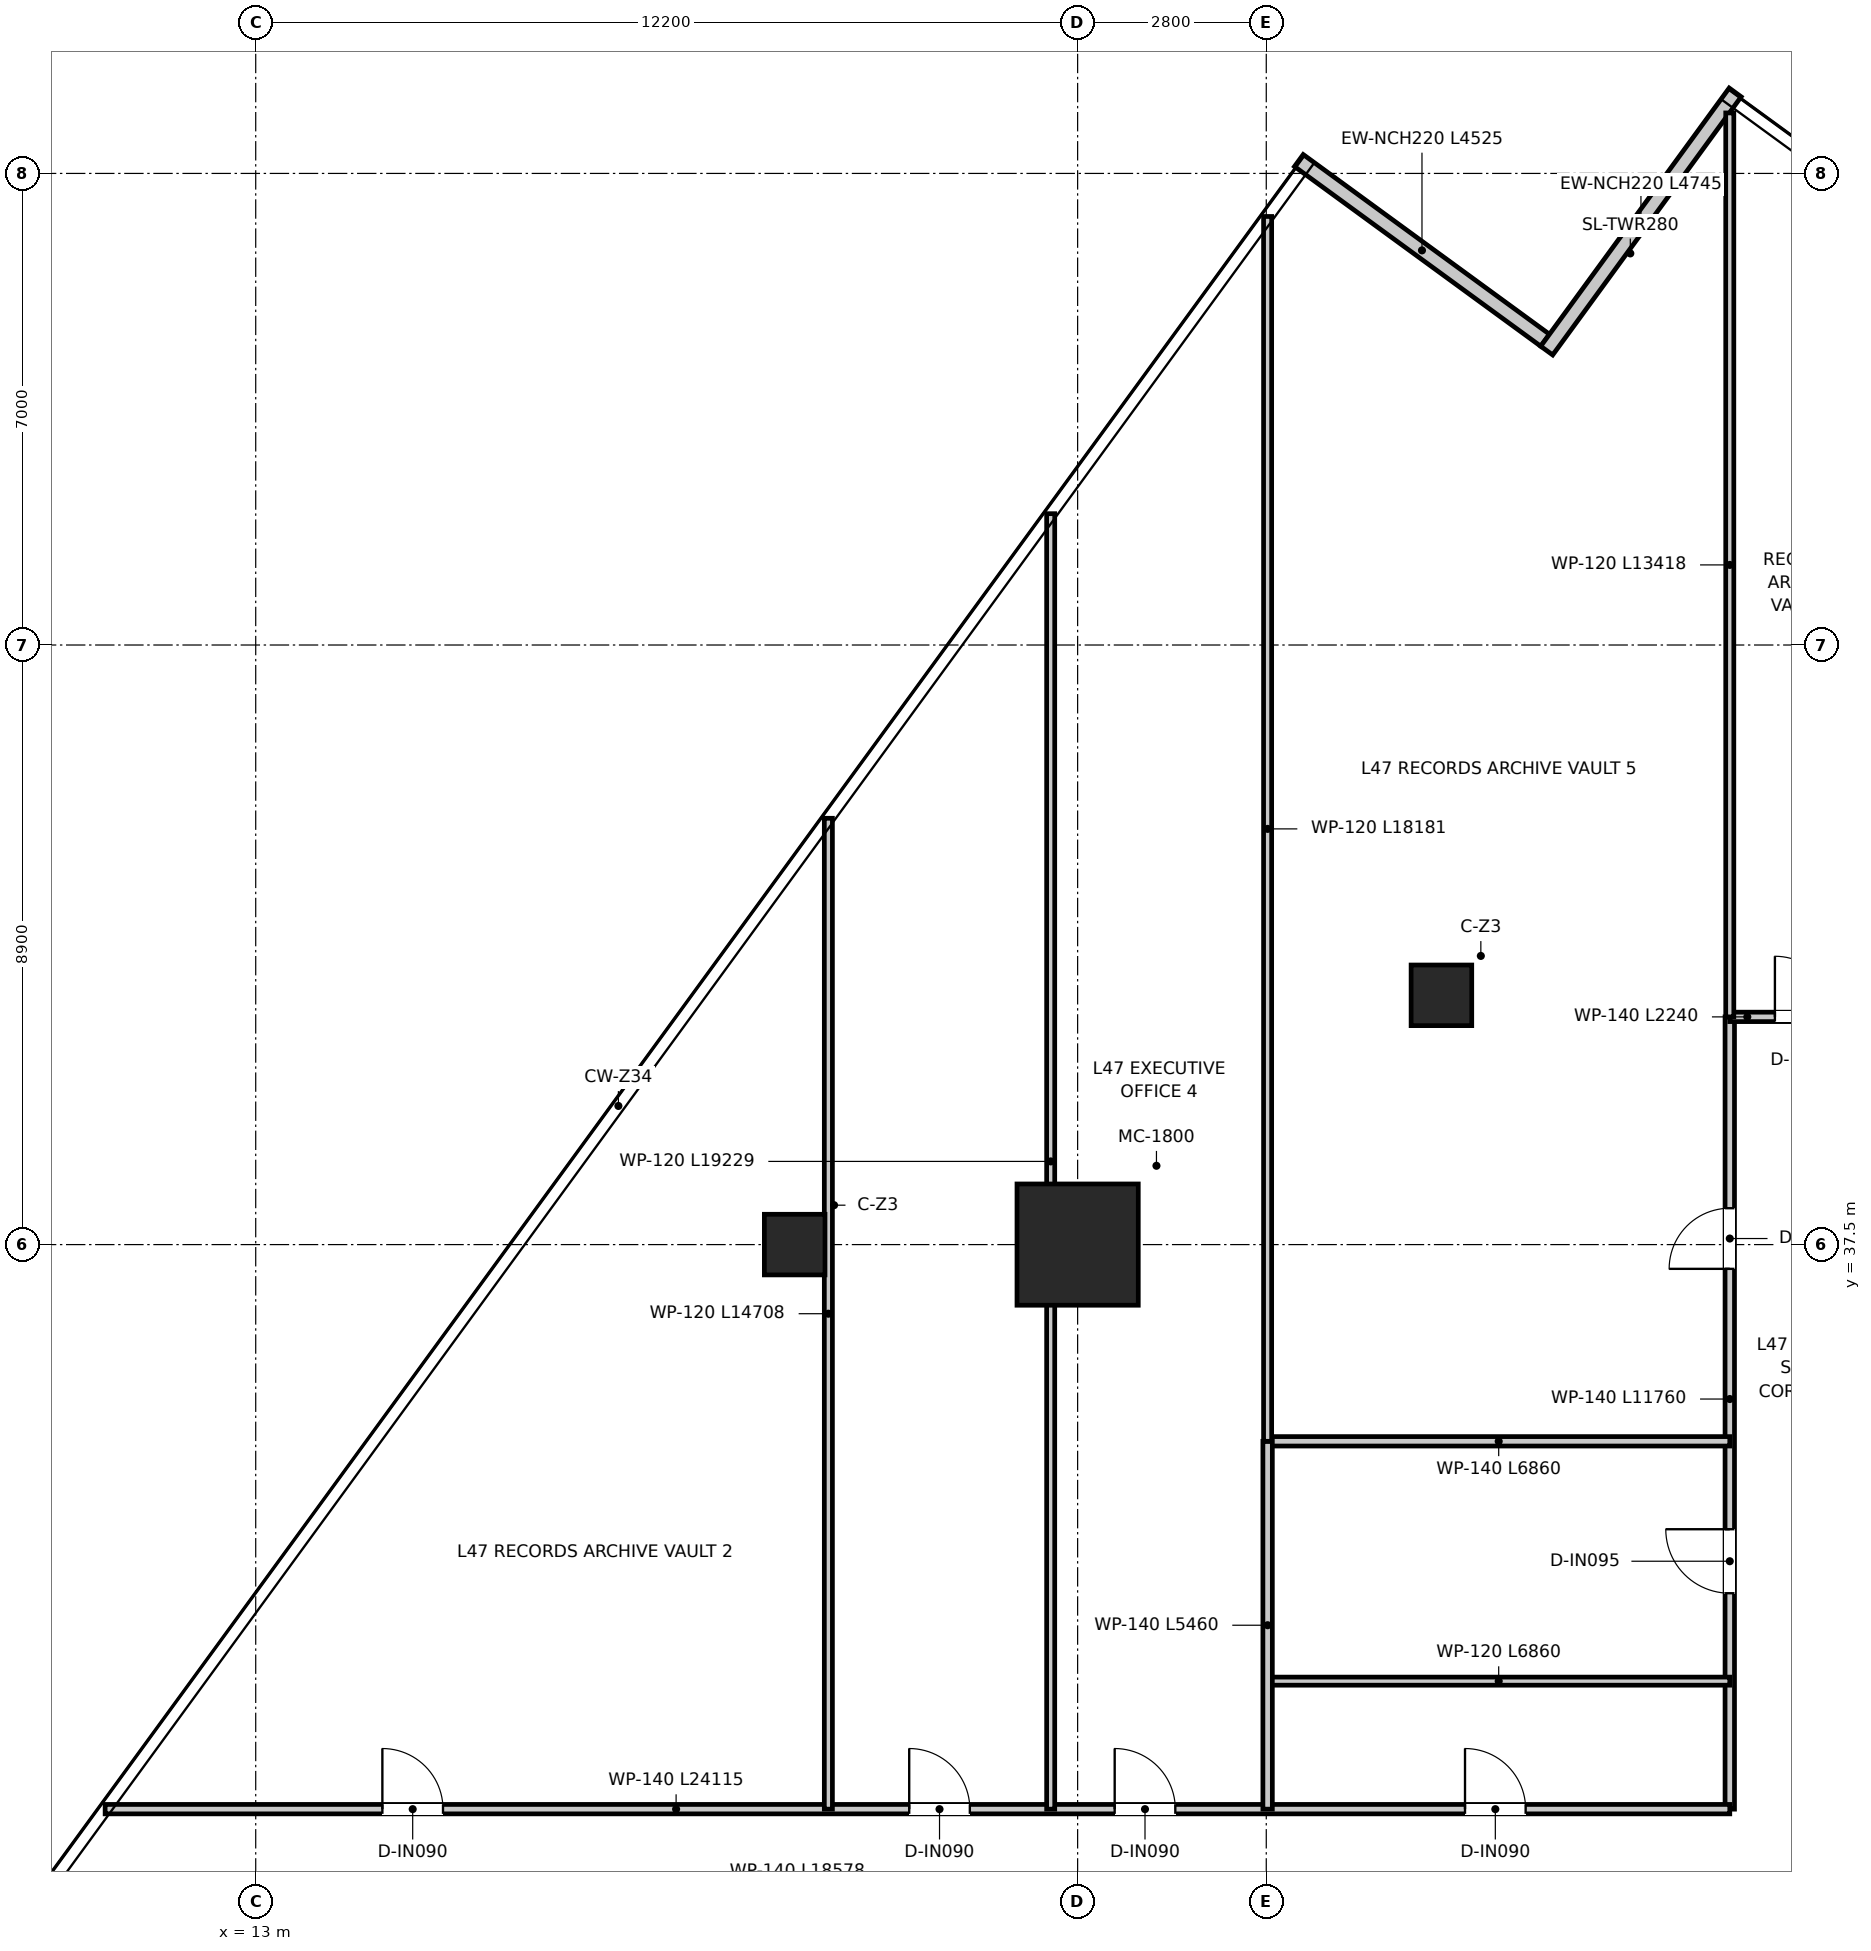
"""IFC4 building model, lengths in metres.
Left out: names, types, materials, properties, quantities, classifications, styles, units other than length and angle.
Written with IfcOpenShell. Run it as: python <this file> out.ifc"""

import sys

from ifc_helpers import new_model, si_unit, direction, frame, frame_2d, origin, origin_2d, place, context, subcontext, project, spatial, rectangle, extrude, source, transform, mapped, element, fill, save


model = new_model("IFC4")
c1 = context("Model", 3, precision=1e-05, world=origin(), true_north=direction((0.0, 1.0)))
c2 = subcontext(c1, "Body", "Model", "MODEL_VIEW")
j1 = project(units=[si_unit("LENGTHUNIT", "METRE"), si_unit("PLANEANGLEUNIT", "RADIAN")], contexts=[c1])
p1 = place(None, origin())
s1 = spatial("IfcSite", under=j1, at=p1, CompositionType="ELEMENT")
p2 = place(p1, origin())
s2 = spatial("IfcBuilding", under=s1, at=p2, CompositionType="ELEMENT")
p3 = place(p2, frame((0.0, 0.0, 193.6)))
s3 = spatial("IfcBuildingStorey", under=s2, at=p3, CompositionType="ELEMENT", Elevation=193.6)
m1 = source(origin(), c2, "Body", "SweptSolid", [
    extrude(rectangle(XDim=1.8, YDim=1.8, at=origin_2d()), origin(), (0.0, 0.0, 1.0), 3.95),
])
p4 = place(p3, frame((25.2, 37.5, 0.0), z_axis=(0.0, 0.0, 1.0), x_axis=(1.0, 0.0, 0.0)))
e1 = element("IfcColumn", 1, at=p4, inside=s3, PredefinedType="USERDEFINED", context=c2, shape_type="MappedRepresentation", body=[
    mapped(m1, transform((0.0, 0.0, 0.0), x_axis=(1.0, 0.0, 0.0), y_axis=(0.0, 1.0, 0.0), z_axis=(0.0, 0.0, 1.0), scale=1.0)),
])
m2 = source(origin(), c2, "Body", "SweptSolid", [
    extrude(rectangle(XDim=0.9, YDim=0.9, at=origin_2d()), origin(), (0.0, 0.0, 1.0), 3.95),
])
for number, where, z_axis, x_axis in (
    (2, (21.0, 37.5, 0.0), (0.0, 0.0, 1.0), (1.0, 0.0, 0.0)),
    (3, (30.6, 41.2, 0.0), (0.0, 0.0, 1.0), (1.0, 0.0, 0.0)),
):
    element("IfcColumn", number, at=place(p3, frame(where, z_axis=z_axis, x_axis=x_axis)), inside=s3, PredefinedType="COLUMN", context=c2, shape_type="MappedRepresentation", body=[
        mapped(m2, transform((0.0, 0.0, 0.0), x_axis=(1.0, 0.0, 0.0), y_axis=(0.0, 1.0, 0.0), z_axis=(0.0, 0.0, 1.0), scale=1.0)),
    ])
p5 = place(p3, frame((32.139, 50.924, 0.0), z_axis=(0.0, 0.0, 1.0), x_axis=(-0.807734007732, 0.589547091209, 0.0)))
e4 = element("IfcWall", 4, at=p5, inside=s3, PredefinedType="ELEMENTEDWALL", context=c2, shape_type="SweptSolid", body=[
    extrude(rectangle(XDim=4.525, YDim=0.22, at=frame_2d((2.263, 0.0))), origin(), (0.0, 0.0, 1.0), 3.67),
])
p6 = place(p3, frame((34.96, 54.603, 0.0), z_axis=(0.0, 0.0, 1.0), x_axis=(-0.589559809791, -0.807724724568, 0.0)))
e5 = element("IfcWall", 5, at=p6, inside=s3, PredefinedType="ELEMENTEDWALL", context=c2, shape_type="SweptSolid", body=[
    extrude(rectangle(XDim=4.745, YDim=0.22, at=frame_2d((2.373, 0.0))), origin(), (0.0, 0.0, 1.0), 3.67),
])
p7 = place(p3, frame((34.88, 29.12, 0.0), z_axis=(0.0, 0.0, 1.0), x_axis=(0.0, 1.0, 0.0)))
e6 = element("IfcWall", 6, at=p7, inside=s3, PredefinedType="PARTITIONING", context=c2, shape_type="SweptSolid", body=[
    extrude(rectangle(XDim=11.76, YDim=0.14, at=frame_2d((5.88, 0.0))), origin(), (0.0, 0.0, 1.0), 3.03),
])
p8 = place(p7, frame((3.205, 0.0, 0.0)))
e7 = element("IfcOpeningElement", 7, at=p8, cuts=e6, PredefinedType="OPENING", context=c2, shape_type="SweptSolid", body=[
    extrude(rectangle(XDim=0.95, YDim=2.1, at=frame_2d((0.475, 1.05))), frame((0.0, 0.08, 0.0), z_axis=(0.0, -1.0, 0.0), x_axis=(1.0, 0.0, 0.0)), (0.0, 0.0, 1.0), 0.16),
])
p9 = place(p7, frame((8.02, 0.0, 0.0)))
e8 = element("IfcOpeningElement", 8, at=p9, cuts=e6, PredefinedType="OPENING", context=c2, shape_type="SweptSolid", body=[
    extrude(rectangle(XDim=0.9, YDim=2.1, at=frame_2d((0.45, 1.05))), frame((0.0, 0.08, 0.0), z_axis=(0.0, -1.0, 0.0), x_axis=(1.0, 0.0, 0.0)), (0.0, 0.0, 1.0), 0.16),
])
p10 = place(p3, frame((34.88, 40.88, 0.0), z_axis=(0.0, 0.0, 1.0), x_axis=(1.0, 0.0, 0.0)))
e9 = element("IfcWall", 9, at=p10, inside=s3, PredefinedType="PARTITIONING", context=c2, shape_type="SweptSolid", body=[
    extrude(rectangle(XDim=2.24, YDim=0.14, at=frame_2d((1.12, 0.0))), origin(), (0.0, 0.0, 1.0), 3.67),
])
p11 = place(p10, frame((0.67, 0.0, 0.0)))
e10 = element("IfcOpeningElement", 10, at=p11, cuts=e9, PredefinedType="OPENING", context=c2, shape_type="SweptSolid", body=[
    extrude(rectangle(XDim=0.9, YDim=2.1, at=frame_2d((0.45, 1.05))), frame((0.0, 0.08, 0.0), z_axis=(0.0, -1.0, 0.0), x_axis=(1.0, 0.0, 0.0)), (0.0, 0.0, 1.0), 0.16),
])
p12 = place(p3, frame((10.765, 29.12, 0.0), z_axis=(0.0, 0.0, 1.0), x_axis=(1.0, 0.0, 0.0)))
e11 = element("IfcWall", 11, at=p12, inside=s3, PredefinedType="PARTITIONING", context=c2, shape_type="SweptSolid", body=[
    extrude(rectangle(XDim=24.115, YDim=0.14, at=frame_2d((12.058, 0.0))), origin(), (0.0, 0.0, 1.0), 3.03),
])
p13 = place(p12, frame((20.185, 0.0, 0.0)))
e12 = element("IfcOpeningElement", 12, at=p13, cuts=e11, PredefinedType="OPENING", context=c2, shape_type="SweptSolid", body=[
    extrude(rectangle(XDim=0.9, YDim=2.1, at=frame_2d((0.45, 1.05))), frame((0.0, 0.08, 0.0), z_axis=(0.0, -1.0, 0.0), x_axis=(1.0, 0.0, 0.0)), (0.0, 0.0, 1.0), 0.16),
])
p14 = place(p12, frame((4.115, 0.0, 0.0)))
e13 = element("IfcOpeningElement", 13, at=p14, cuts=e11, PredefinedType="OPENING", context=c2, shape_type="SweptSolid", body=[
    extrude(rectangle(XDim=0.9, YDim=2.1, at=frame_2d((0.45, 1.05))), frame((0.0, 0.08, 0.0), z_axis=(0.0, -1.0, 0.0), x_axis=(1.0, 0.0, 0.0)), (0.0, 0.0, 1.0), 0.16),
])
p15 = place(p12, frame((11.935, 0.0, 0.0)))
e14 = element("IfcOpeningElement", 14, at=p15, cuts=e11, PredefinedType="OPENING", context=c2, shape_type="SweptSolid", body=[
    extrude(rectangle(XDim=0.9, YDim=2.1, at=frame_2d((0.45, 1.05))), frame((0.0, 0.08, 0.0), z_axis=(0.0, -1.0, 0.0), x_axis=(1.0, 0.0, 0.0)), (0.0, 0.0, 1.0), 0.16),
])
p16 = place(p12, frame((14.985, 0.0, 0.0)))
e15 = element("IfcOpeningElement", 15, at=p16, cuts=e11, PredefinedType="OPENING", context=c2, shape_type="SweptSolid", body=[
    extrude(rectangle(XDim=0.9, YDim=2.1, at=frame_2d((0.45, 1.05))), frame((0.0, 0.08, 0.0), z_axis=(0.0, -1.0, 0.0), x_axis=(1.0, 0.0, 0.0)), (0.0, 0.0, 1.0), 0.16),
])
p17 = place(p3, frame((28.02, 31.02, 0.0), z_axis=(0.0, 0.0, 1.0), x_axis=(1.0, 0.0, 0.0)))
e16 = element("IfcWall", 16, at=p17, inside=s3, PredefinedType="PARTITIONING", context=c2, shape_type="SweptSolid", body=[
    extrude(rectangle(XDim=6.86, YDim=0.12, at=frame_2d((3.43, 0.0))), origin(), (0.0, 0.0, 1.0), 3.08),
])
p18 = place(p3, frame((28.02, 34.58, 0.0), z_axis=(0.0, 0.0, 1.0), x_axis=(1.0, 0.0, 0.0)))
e17 = element("IfcWall", 17, at=p18, inside=s3, PredefinedType="PARTITIONING", context=c2, shape_type="SweptSolid", body=[
    extrude(rectangle(XDim=6.86, YDim=0.14, at=frame_2d((3.43, 0.0))), origin(), (0.0, 0.0, 1.0), 3.08),
])
p19 = place(p3, frame((28.02, 29.12, 0.0), z_axis=(0.0, 0.0, 1.0), x_axis=(0.0, 1.0, 0.0)))
e18 = element("IfcWall", 18, at=p19, inside=s3, PredefinedType="PARTITIONING", context=c2, shape_type="SweptSolid", body=[
    extrude(rectangle(XDim=5.46, YDim=0.14, at=frame_2d((2.73, 0.0))), origin(), (0.0, 0.0, 1.0), 3.31),
])
p20 = place(p3, frame((34.88, 40.88, 0.0), z_axis=(0.0, 0.0, 1.0), x_axis=(0.0, 1.0, 0.0)))
e19 = element("IfcWall", 19, at=p20, inside=s3, PredefinedType="PARTITIONING", context=c2, shape_type="SweptSolid", body=[
    extrude(rectangle(XDim=13.418, YDim=0.12, at=frame_2d((6.709, 0.0))), origin(), (0.0, 0.0, 1.0), 3.28),
])
p21 = place(p3, frame((21.5, 29.12, 0.0), z_axis=(0.0, 0.0, 1.0), x_axis=(0.0, 1.0, 0.0)))
e20 = element("IfcWall", 20, at=p21, inside=s3, PredefinedType="PARTITIONING", context=c2, shape_type="SweptSolid", body=[
    extrude(rectangle(XDim=14.708, YDim=0.12, at=frame_2d((7.354, 0.0))), origin(), (0.0, 0.0, 1.0), 3.08),
])
p22 = place(p3, frame((24.8, 29.12, 0.0), z_axis=(0.0, 0.0, 1.0), x_axis=(0.0, 1.0, 0.0)))
e21 = element("IfcWall", 21, at=p22, inside=s3, PredefinedType="PARTITIONING", context=c2, shape_type="SweptSolid", body=[
    extrude(rectangle(XDim=19.229, YDim=0.12, at=frame_2d((9.615, 0.0))), origin(), (0.0, 0.0, 1.0), 3.08),
])
p23 = place(p3, frame((28.02, 34.58, 0.0), z_axis=(0.0, 0.0, 1.0), x_axis=(0.0, 1.0, 0.0)))
e22 = element("IfcWall", 22, at=p23, inside=s3, PredefinedType="PARTITIONING", context=c2, shape_type="SweptSolid", body=[
    extrude(rectangle(XDim=18.181, YDim=0.12, at=frame_2d((9.09, 0.0))), origin(), (0.0, 0.0, 1.0), 3.03),
])
p24 = place(p13, origin())
e23 = element("IfcDoor", 23, at=p24, inside=s3, OperationType="SINGLE_SWING_LEFT", PredefinedType="DOOR", context=c2, shape_type="SweptSolid", body=[
    extrude(rectangle(XDim=0.9, YDim=2.1, at=frame_2d((0.45, 1.05))), frame((0.0, 0.025, 0.0), z_axis=(0.0, -1.0, 0.0), x_axis=(1.0, 0.0, 0.0)), (0.0, 0.0, 1.0), 0.05),
])
fill(e12, e23)
p25 = place(p8, origin())
e24 = element("IfcDoor", 24, at=p25, inside=s3, OperationType="SINGLE_SWING_RIGHT", PredefinedType="DOOR", context=c2, shape_type="SweptSolid", body=[
    extrude(rectangle(XDim=0.95, YDim=2.1, at=frame_2d((0.475, 1.05))), frame((0.0, 0.025, 0.0), z_axis=(0.0, -1.0, 0.0), x_axis=(1.0, 0.0, 0.0)), (0.0, 0.0, 1.0), 0.05),
])
fill(e7, e24)
p26 = place(p11, origin())
e25 = element("IfcDoor", 25, at=p26, inside=s3, OperationType="SINGLE_SWING_LEFT", PredefinedType="DOOR", context=c2, shape_type="SweptSolid", body=[
    extrude(rectangle(XDim=0.9, YDim=2.1, at=frame_2d((0.45, 1.05))), frame((0.0, 0.025, 0.0), z_axis=(0.0, -1.0, 0.0), x_axis=(1.0, 0.0, 0.0)), (0.0, 0.0, 1.0), 0.05),
])
fill(e10, e25)
p27 = place(p14, origin())
e26 = element("IfcDoor", 26, at=p27, inside=s3, OperationType="SINGLE_SWING_LEFT", PredefinedType="DOOR", context=c2, shape_type="SweptSolid", body=[
    extrude(rectangle(XDim=0.9, YDim=2.1, at=frame_2d((0.45, 1.05))), frame((0.0, 0.025, 0.0), z_axis=(0.0, -1.0, 0.0), x_axis=(1.0, 0.0, 0.0)), (0.0, 0.0, 1.0), 0.05),
])
fill(e13, e26)
p28 = place(p15, origin())
e27 = element("IfcDoor", 27, at=p28, inside=s3, OperationType="SINGLE_SWING_LEFT", PredefinedType="DOOR", context=c2, shape_type="SweptSolid", body=[
    extrude(rectangle(XDim=0.9, YDim=2.1, at=frame_2d((0.45, 1.05))), frame((0.0, 0.025, 0.0), z_axis=(0.0, -1.0, 0.0), x_axis=(1.0, 0.0, 0.0)), (0.0, 0.0, 1.0), 0.05),
])
fill(e14, e27)
p29 = place(p16, origin())
e28 = element("IfcDoor", 28, at=p29, inside=s3, OperationType="SINGLE_SWING_LEFT", PredefinedType="DOOR", context=c2, shape_type="SweptSolid", body=[
    extrude(rectangle(XDim=0.9, YDim=2.1, at=frame_2d((0.45, 1.05))), frame((0.0, 0.025, 0.0), z_axis=(0.0, -1.0, 0.0), x_axis=(1.0, 0.0, 0.0)), (0.0, 0.0, 1.0), 0.05),
])
fill(e15, e28)
p30 = place(p9, origin())
e29 = element("IfcDoor", 29, at=p30, inside=s3, OperationType="SINGLE_SWING_LEFT", PredefinedType="DOOR", context=c2, shape_type="SweptSolid", body=[
    extrude(rectangle(XDim=0.9, YDim=2.1, at=frame_2d((0.45, 1.05))), frame((0.0, 0.025, 0.0), z_axis=(0.0, -1.0, 0.0), x_axis=(1.0, 0.0, 0.0)), (0.0, 0.0, 1.0), 0.05),
])
fill(e8, e29)
save(model, sys.argv[1])
